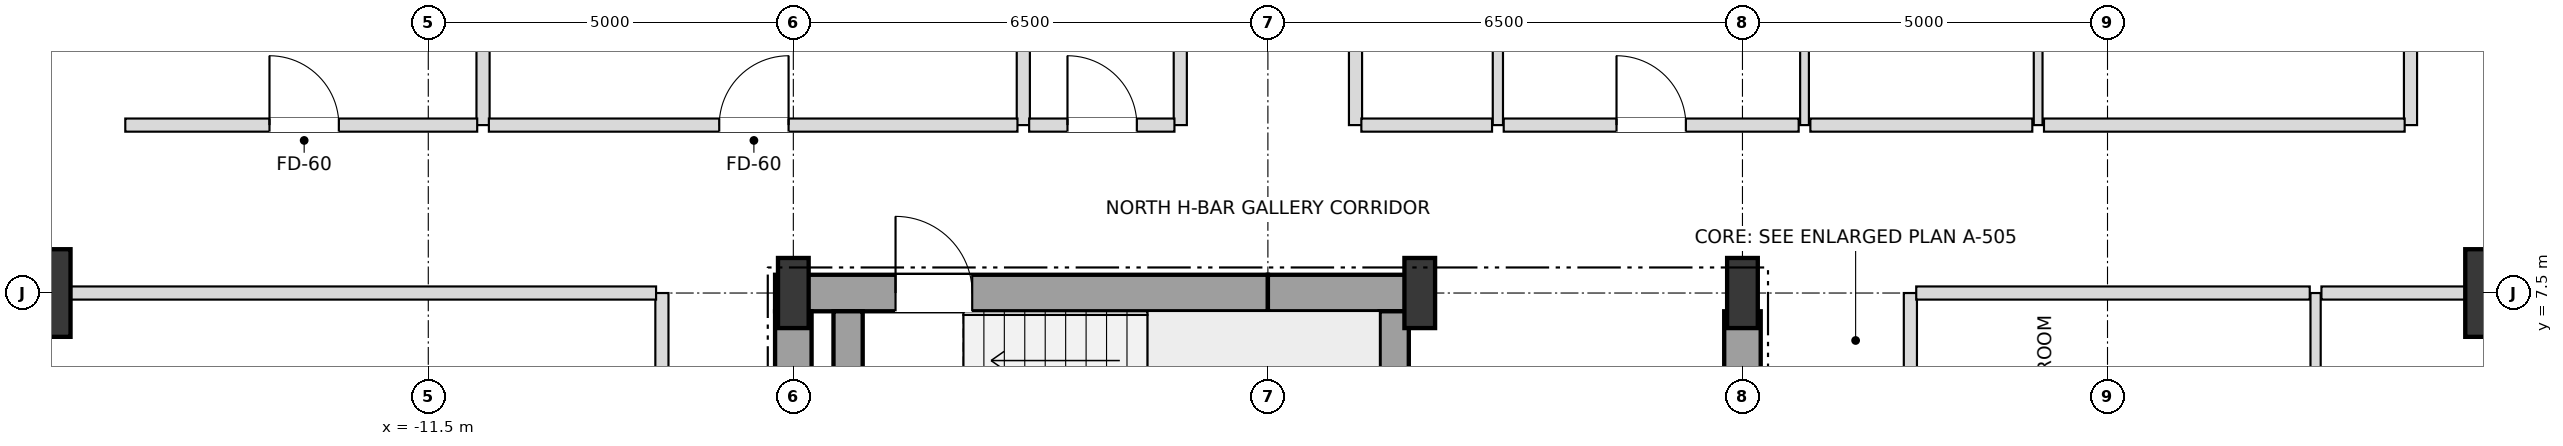
"""IFC4 building model, lengths in metres.
Left out: names, types, materials, properties, quantities, classifications, styles, units other than length and angle.
Written with IfcOpenShell. Run it as: python <this file> out.ifc"""

import sys

from ifc_helpers import new_model, si_unit, direction, frame, frame_2d, origin, origin_2d, place, context, subcontext, project, spatial, rectangle, i_section, extrude, element, fill, save


model = new_model("IFC4")
c1 = context("Model", 3, precision=1e-05, world=origin(), true_north=direction((0.0, 1.0)))
c2 = subcontext(c1, "Body", "Model", "MODEL_VIEW")
j1 = project(units=[si_unit("LENGTHUNIT", "METRE"), si_unit("PLANEANGLEUNIT", "RADIAN")], contexts=[c1])
p1 = place(None, origin())
s1 = spatial("IfcSite", under=j1, at=p1, CompositionType="ELEMENT")
p2 = place(p1, origin())
s2 = spatial("IfcBuilding", under=s1, at=p2, CompositionType="ELEMENT")
p3 = place(p2, frame((0.0, 0.0, 158.4)))
s3 = spatial("IfcBuildingStorey", under=s2, at=p3, CompositionType="ELEMENT", Elevation=158.4)
for number, where, z_axis, x_axis in (
    (1, (-6.5, 7.5, 0.0), (0.0, 0.0, 1.0), (1.0, 0.0, 0.0)),
    (2, (2.08, 7.5, 0.0), (0.0, 0.0, 1.0), (1.0, 0.0, 0.0)),
    (3, (6.5, 7.5, 0.0), (0.0, 0.0, 1.0), (1.0, 0.0, 0.0)),
):
    element("IfcColumn", number, at=place(p3, frame(where, z_axis=z_axis, x_axis=x_axis)), inside=s3, PredefinedType="COLUMN", context=c2, shape_type="SweptSolid", body=[
        extrude(i_section(OverallWidth=0.42, OverallDepth=0.96, WebThickness=0.022, FlangeThickness=0.034, at=origin_2d()), origin(), (0.0, 0.0, 1.0), 3.6),
    ])
for number, where, z_axis, x_axis in (
    (4, (17.0, 7.5, 0.0), (0.0, 0.0, 1.0), (1.0, 0.0, 0.0)),
    (5, (-17.0, 7.5, 0.0), (0.0, 0.0, 1.0), (1.0, 0.0, 0.0)),
):
    element("IfcColumn", number, at=place(p3, frame(where, z_axis=z_axis, x_axis=x_axis)), inside=s3, PredefinedType="USERDEFINED", context=c2, shape_type="SweptSolid", body=[
        extrude(rectangle(XDim=1.2, YDim=1.2, at=origin_2d()), origin(), (0.0, 0.0, 1.0), 3.6),
    ])
p4 = place(p3, frame((-6.75, 7.5, 0.0), z_axis=(0.0, 0.0, 1.0), x_axis=(1.0, 0.0, 0.0)))
e6 = element("IfcWall", 6, at=p4, inside=s3, PredefinedType="SHEAR", context=c2, shape_type="SweptSolid", body=[
    extrude(rectangle(XDim=6.75, YDim=0.5, at=frame_2d((3.375, 0.0))), origin(), (0.0, 0.0, 1.0), 3.38),
])
p5 = place(p4, frame((1.65, 0.0, 0.0)))
e7 = element("IfcOpeningElement", 7, at=p5, cuts=e6, PredefinedType="OPENING", context=c2, shape_type="SweptSolid", body=[
    extrude(rectangle(XDim=1.05, YDim=2.15, at=frame_2d((0.525, 1.075))), frame((0.0, 0.26, 0.0), z_axis=(0.0, -1.0, 0.0), x_axis=(1.0, 0.0, 0.0)), (0.0, 0.0, 1.0), 0.52),
])
p6 = place(p3, frame((0.0, 7.5, 0.0), z_axis=(0.0, 0.0, 1.0), x_axis=(1.0, 0.0, 0.0)))
e8 = element("IfcWall", 8, at=p6, inside=s3, PredefinedType="SHEAR", context=c2, shape_type="SweptSolid", body=[
    extrude(rectangle(XDim=2.08, YDim=0.5, at=frame_2d((1.04, 0.0))), origin(), (0.0, 0.0, 1.0), 3.38),
])
for number, where, z_axis, x_axis in (
    (9, (-6.5, 3.95, 0.0), (0.0, 0.0, 1.0), (0.0, 1.0, 0.0)),
    (10, (6.5, 3.95, 0.0), (0.0, 0.0, 1.0), (0.0, 1.0, 0.0)),
):
    element("IfcWall", number, at=place(p3, frame(where, z_axis=z_axis, x_axis=x_axis)), inside=s3, PredefinedType="SHEAR", context=c2, shape_type="SweptSolid", body=[
        extrude(rectangle(XDim=3.3, YDim=0.5, at=frame_2d((1.65, 0.0))), origin(), (0.0, 0.0, 1.0), 3.38),
    ])
for number, where, z_axis, x_axis in (
    (11, (1.73, 3.95, 0.0), (0.0, 0.0, 1.0), (0.0, 1.0, 0.0)),
    (12, (-5.75, 3.95, 0.0), (0.0, 0.0, 1.0), (0.0, 1.0, 0.0)),
):
    element("IfcWall", number, at=place(p3, frame(where, z_axis=z_axis, x_axis=x_axis)), inside=s3, PredefinedType="SHEAR", context=c2, shape_type="SweptSolid", body=[
        extrude(rectangle(XDim=3.3, YDim=0.4, at=frame_2d((1.65, 0.0))), origin(), (0.0, 0.0, 1.0), 3.38),
    ])
p7 = place(p3, frame((-10.75, 9.8, 0.0), z_axis=(0.0, 0.0, 1.0), x_axis=(0.0, 1.0, 0.0)))
e13 = element("IfcWall", 13, at=p7, inside=s3, PredefinedType="PARTITIONING", context=c2, shape_type="SweptSolid", body=[
    extrude(rectangle(XDim=13.35, YDim=0.18, at=frame_2d((6.675, 0.0))), origin(), (0.0, 0.0, 1.0), 2.816),
])
p8 = place(p3, frame((-8.3, -7.5, 0.0), z_axis=(0.0, 0.0, 1.0), x_axis=(0.0, 1.0, 0.0)))
e14 = element("IfcWall", 14, at=p8, inside=s3, PredefinedType="PARTITIONING", context=c2, shape_type="SweptSolid", body=[
    extrude(rectangle(XDim=15.0, YDim=0.18, at=frame_2d((7.5, 0.0))), origin(), (0.0, 0.0, 1.0), 3.38),
])
p9 = place(p8, frame((0.605, 0.0, 0.0)))
e15 = element("IfcOpeningElement", 15, at=p9, cuts=e14, PredefinedType="OPENING", context=c2, shape_type="SweptSolid", body=[
    extrude(rectangle(XDim=0.95, YDim=2.15, at=frame_2d((0.475, 1.075))), frame((0.0, 0.1, 0.0), z_axis=(0.0, -1.0, 0.0), x_axis=(1.0, 0.0, 0.0)), (0.0, 0.0, 1.0), 0.2),
])
p10 = place(p8, frame((2.605, 0.0, 0.0)))
e16 = element("IfcOpeningElement", 16, at=p10, cuts=e14, PredefinedType="OPENING", context=c2, shape_type="SweptSolid", body=[
    extrude(rectangle(XDim=0.95, YDim=2.15, at=frame_2d((0.475, 1.075))), frame((0.0, 0.1, 0.0), z_axis=(0.0, -1.0, 0.0), x_axis=(1.0, 0.0, 0.0)), (0.0, 0.0, 1.0), 0.2),
])
for number, where, z_axis, x_axis in (
    (17, (-3.35, 9.8, 0.0), (0.0, 0.0, 1.0), (0.0, 1.0, 0.0)),
    (18, (-1.2, 9.8, 0.0), (0.0, 0.0, 1.0), (0.0, 1.0, 0.0)),
    (19, (1.2, 9.8, 0.0), (0.0, 0.0, 1.0), (0.0, 1.0, 0.0)),
):
    element("IfcWall", number, at=place(p3, frame(where, z_axis=z_axis, x_axis=x_axis)), inside=s3, PredefinedType="PARTITIONING", context=c2, shape_type="SweptSolid", body=[
        extrude(rectangle(XDim=13.35, YDim=0.18, at=frame_2d((6.675, 0.0))), origin(), (0.0, 0.0, 1.0), 2.816),
    ])
p11 = place(p3, frame((3.15, 9.8, 0.0), z_axis=(0.0, 0.0, 1.0), x_axis=(0.0, 1.0, 0.0)))
e20 = element("IfcWall", 20, at=p11, inside=s3, PredefinedType="PARTITIONING", context=c2, shape_type="SweptSolid", body=[
    extrude(rectangle(XDim=7.35, YDim=0.14, at=frame_2d((3.675, 0.0))), origin(), (0.0, 0.0, 1.0), 3.38),
])
p12 = place(p11, frame((3.22, 0.0, 0.0)))
e21 = element("IfcOpeningElement", 21, at=p12, cuts=e20, PredefinedType="OPENING", context=c2, shape_type="SweptSolid", body=[
    extrude(rectangle(XDim=0.9, YDim=2.1, at=frame_2d((0.45, 1.05))), frame((0.0, 0.08, 0.0), z_axis=(0.0, -1.0, 0.0), x_axis=(1.0, 0.0, 0.0)), (0.0, 0.0, 1.0), 0.16),
])
p13 = place(p3, frame((7.35, 9.8, 0.0), z_axis=(0.0, 0.0, 1.0), x_axis=(0.0, 1.0, 0.0)))
e22 = element("IfcWall", 22, at=p13, inside=s3, PredefinedType="PARTITIONING", context=c2, shape_type="SweptSolid", body=[
    extrude(rectangle(XDim=13.35, YDim=0.12, at=frame_2d((6.675, 0.0))), origin(), (0.0, 0.0, 1.0), 2.816),
])
p14 = place(p13, frame((3.195, 0.0, 0.0)))
e23 = element("IfcOpeningElement", 23, at=p14, cuts=e22, PredefinedType="OPENING", context=c2, shape_type="SweptSolid", body=[
    extrude(rectangle(XDim=0.95, YDim=2.1, at=frame_2d((0.475, 1.05))), frame((0.0, 0.07, 0.0), z_axis=(0.0, -1.0, 0.0), x_axis=(1.0, 0.0, 0.0)), (0.0, 0.0, 1.0), 0.14),
])
p15 = place(p13, frame((11.051, 0.0, 0.0)))
e24 = element("IfcOpeningElement", 24, at=p15, cuts=e22, PredefinedType="OPENING", context=c2, shape_type="SweptSolid", body=[
    extrude(rectangle(XDim=0.9, YDim=2.1, at=frame_2d((0.45, 1.05))), frame((0.0, 0.07, 0.0), z_axis=(0.0, -1.0, 0.0), x_axis=(1.0, 0.0, 0.0)), (0.0, 0.0, 1.0), 0.14),
])
p16 = place(p3, frame((8.8, -7.5, 0.0), z_axis=(0.0, 0.0, 1.0), x_axis=(0.0, 1.0, 0.0)))
e25 = element("IfcWall", 25, at=p16, inside=s3, PredefinedType="PARTITIONING", context=c2, shape_type="SweptSolid", body=[
    extrude(rectangle(XDim=15.0, YDim=0.18, at=frame_2d((7.5, 0.0))), origin(), (0.0, 0.0, 1.0), 3.38),
])
p17 = place(p16, frame((3.475, 0.0, 0.0)))
e26 = element("IfcOpeningElement", 26, at=p17, cuts=e25, PredefinedType="OPENING", context=c2, shape_type="SweptSolid", body=[
    extrude(rectangle(XDim=0.95, YDim=2.15, at=frame_2d((0.475, 1.075))), frame((0.0, 0.1, 0.0), z_axis=(0.0, -1.0, 0.0), x_axis=(1.0, 0.0, 0.0)), (0.0, 0.0, 1.0), 0.2),
])
p18 = place(p3, frame((10.55, 9.8, 0.0), z_axis=(0.0, 0.0, 1.0), x_axis=(0.0, 1.0, 0.0)))
e27 = element("IfcWall", 27, at=p18, inside=s3, PredefinedType="PARTITIONING", context=c2, shape_type="SweptSolid", body=[
    extrude(rectangle(XDim=13.35, YDim=0.12, at=frame_2d((6.675, 0.0))), origin(), (0.0, 0.0, 1.0), 2.816),
])
p19 = place(p18, frame((3.713, 0.0, 0.0)))
e28 = element("IfcOpeningElement", 28, at=p19, cuts=e27, PredefinedType="OPENING", context=c2, shape_type="SweptSolid", body=[
    extrude(rectangle(XDim=0.95, YDim=2.1, at=frame_2d((0.475, 1.05))), frame((0.0, 0.07, 0.0), z_axis=(0.0, -1.0, 0.0), x_axis=(1.0, 0.0, 0.0)), (0.0, 0.0, 1.0), 0.14),
])
p20 = place(p18, frame((11.051, 0.0, 0.0)))
e29 = element("IfcOpeningElement", 29, at=p20, cuts=e27, PredefinedType="OPENING", context=c2, shape_type="SweptSolid", body=[
    extrude(rectangle(XDim=0.9, YDim=2.1, at=frame_2d((0.45, 1.05))), frame((0.0, 0.07, 0.0), z_axis=(0.0, -1.0, 0.0), x_axis=(1.0, 0.0, 0.0)), (0.0, 0.0, 1.0), 0.14),
])
p21 = place(p3, frame((14.35, -7.5, 0.0), z_axis=(0.0, 0.0, 1.0), x_axis=(0.0, 1.0, 0.0)))
e30 = element("IfcWall", 30, at=p21, inside=s3, PredefinedType="PARTITIONING", context=c2, shape_type="SweptSolid", body=[
    extrude(rectangle(XDim=15.0, YDim=0.14, at=frame_2d((7.5, 0.0))), origin(), (0.0, 0.0, 1.0), 3.38),
])
p22 = place(p21, frame((3.475, 0.0, 0.0)))
e31 = element("IfcOpeningElement", 31, at=p22, cuts=e30, PredefinedType="OPENING", context=c2, shape_type="SweptSolid", body=[
    extrude(rectangle(XDim=0.95, YDim=2.1, at=frame_2d((0.475, 1.05))), frame((0.0, 0.08, 0.0), z_axis=(0.0, -1.0, 0.0), x_axis=(1.0, 0.0, 0.0)), (0.0, 0.0, 1.0), 0.16),
])
p23 = place(p3, frame((15.65, 9.8, 0.0), z_axis=(0.0, 0.0, 1.0), x_axis=(0.0, 1.0, 0.0)))
e32 = element("IfcWall", 32, at=p23, inside=s3, PredefinedType="PARTITIONING", context=c2, shape_type="SweptSolid", body=[
    extrude(rectangle(XDim=7.35, YDim=0.18, at=frame_2d((3.675, 0.0))), origin(), (0.0, 0.0, 1.0), 2.736),
])
p24 = place(p3, frame((-20.15, 7.5, 0.0), z_axis=(0.0, 0.0, 1.0), x_axis=(1.0, 0.0, 0.0)))
e33 = element("IfcWall", 33, at=p24, inside=s3, PredefinedType="PARTITIONING", context=c2, shape_type="SweptSolid", body=[
    extrude(rectangle(XDim=11.77, YDim=0.18, at=frame_2d((5.885, 0.0))), origin(), (0.0, 0.0, 1.0), 2.816),
])
p25 = place(p3, frame((8.88, 7.5, 0.0), z_axis=(0.0, 0.0, 1.0), x_axis=(1.0, 0.0, 0.0)))
e34 = element("IfcWall", 34, at=p25, inside=s3, PredefinedType="PARTITIONING", context=c2, shape_type="SweptSolid", body=[
    extrude(rectangle(XDim=5.39, YDim=0.18, at=frame_2d((2.695, 0.0))), origin(), (0.0, 0.0, 1.0), 2.816),
])
p26 = place(p3, frame((14.43, 7.5, 0.0), z_axis=(0.0, 0.0, 1.0), x_axis=(1.0, 0.0, 0.0)))
e35 = element("IfcWall", 35, at=p26, inside=s3, PredefinedType="PARTITIONING", context=c2, shape_type="SweptSolid", body=[
    extrude(rectangle(XDim=5.72, YDim=0.18, at=frame_2d((2.86, 0.0))), origin(), (0.0, 0.0, 1.0), 2.816),
])
p27 = place(p3, frame((-15.65, 9.8, 0.0), z_axis=(0.0, 0.0, 1.0), x_axis=(1.0, 0.0, 0.0)))
e36 = element("IfcWall", 36, at=p27, inside=s3, PredefinedType="PARTITIONING", context=c2, shape_type="SweptSolid", body=[
    extrude(rectangle(XDim=4.82, YDim=0.18, at=frame_2d((2.41, 0.0))), origin(), (0.0, 0.0, 1.0), 3.38),
])
p28 = place(p27, frame((1.975, 0.0, 0.0)))
e37 = element("IfcOpeningElement", 37, at=p28, cuts=e36, PredefinedType="OPENING", context=c2, shape_type="SweptSolid", body=[
    extrude(rectangle(XDim=0.95, YDim=2.15, at=frame_2d((0.475, 1.075))), frame((0.0, 0.1, 0.0), z_axis=(0.0, -1.0, 0.0), x_axis=(1.0, 0.0, 0.0)), (0.0, 0.0, 1.0), 0.2),
])
p29 = place(p3, frame((-10.67, 9.8, 0.0), z_axis=(0.0, 0.0, 1.0), x_axis=(1.0, 0.0, 0.0)))
e38 = element("IfcWall", 38, at=p29, inside=s3, PredefinedType="PARTITIONING", context=c2, shape_type="SweptSolid", body=[
    extrude(rectangle(XDim=7.24, YDim=0.18, at=frame_2d((3.62, 0.0))), origin(), (0.0, 0.0, 1.0), 2.816),
])
p30 = place(p29, frame((3.155, 0.0, 0.0)))
e39 = element("IfcOpeningElement", 39, at=p30, cuts=e38, PredefinedType="OPENING", context=c2, shape_type="SweptSolid", body=[
    extrude(rectangle(XDim=0.95, YDim=2.15, at=frame_2d((0.475, 1.075))), frame((0.0, 0.1, 0.0), z_axis=(0.0, -1.0, 0.0), x_axis=(1.0, 0.0, 0.0)), (0.0, 0.0, 1.0), 0.2),
])
p31 = place(p3, frame((-3.27, 9.8, 0.0), z_axis=(0.0, 0.0, 1.0), x_axis=(1.0, 0.0, 0.0)))
e40 = element("IfcWall", 40, at=p31, inside=s3, PredefinedType="PARTITIONING", context=c2, shape_type="SweptSolid", body=[
    extrude(rectangle(XDim=1.99, YDim=0.18, at=frame_2d((0.995, 0.0))), origin(), (0.0, 0.0, 1.0), 3.38),
])
p32 = place(p31, frame((0.525, 0.0, 0.0)))
e41 = element("IfcOpeningElement", 41, at=p32, cuts=e40, PredefinedType="OPENING", context=c2, shape_type="SweptSolid", body=[
    extrude(rectangle(XDim=0.95, YDim=2.15, at=frame_2d((0.475, 1.075))), frame((0.0, 0.1, 0.0), z_axis=(0.0, -1.0, 0.0), x_axis=(1.0, 0.0, 0.0)), (0.0, 0.0, 1.0), 0.2),
])
p33 = place(p3, frame((1.28, 9.8, 0.0), z_axis=(0.0, 0.0, 1.0), x_axis=(1.0, 0.0, 0.0)))
e42 = element("IfcWall", 42, at=p33, inside=s3, PredefinedType="PARTITIONING", context=c2, shape_type="SweptSolid", body=[
    extrude(rectangle(XDim=1.79, YDim=0.18, at=frame_2d((0.895, 0.0))), origin(), (0.0, 0.0, 1.0), 3.38),
])
p34 = place(p3, frame((3.23, 9.8, 0.0), z_axis=(0.0, 0.0, 1.0), x_axis=(1.0, 0.0, 0.0)))
e43 = element("IfcWall", 43, at=p34, inside=s3, PredefinedType="PARTITIONING", context=c2, shape_type="SweptSolid", body=[
    extrude(rectangle(XDim=4.04, YDim=0.18, at=frame_2d((2.02, 0.0))), origin(), (0.0, 0.0, 1.0), 2.816),
])
p35 = place(p34, frame((1.545, 0.0, 0.0)))
e44 = element("IfcOpeningElement", 44, at=p35, cuts=e43, PredefinedType="OPENING", context=c2, shape_type="SweptSolid", body=[
    extrude(rectangle(XDim=0.95, YDim=2.15, at=frame_2d((0.475, 1.075))), frame((0.0, 0.1, 0.0), z_axis=(0.0, -1.0, 0.0), x_axis=(1.0, 0.0, 0.0)), (0.0, 0.0, 1.0), 0.2),
])
p36 = place(p3, frame((7.43, 9.8, 0.0), z_axis=(0.0, 0.0, 1.0), x_axis=(1.0, 0.0, 0.0)))
e45 = element("IfcWall", 45, at=p36, inside=s3, PredefinedType="PARTITIONING", context=c2, shape_type="SweptSolid", body=[
    extrude(rectangle(XDim=3.04, YDim=0.18, at=frame_2d((1.52, 0.0))), origin(), (0.0, 0.0, 1.0), 3.38),
])
p37 = place(p3, frame((10.63, 9.8, 0.0), z_axis=(0.0, 0.0, 1.0), x_axis=(1.0, 0.0, 0.0)))
e46 = element("IfcWall", 46, at=p37, inside=s3, PredefinedType="PARTITIONING", context=c2, shape_type="SweptSolid", body=[
    extrude(rectangle(XDim=4.94, YDim=0.18, at=frame_2d((2.47, 0.0))), origin(), (0.0, 0.0, 1.0), 3.38),
])
p38 = place(p5, origin())
e47 = element("IfcDoor", 47, at=p38, inside=s3, OperationType="SINGLE_SWING_LEFT", PredefinedType="DOOR", context=c2, shape_type="SweptSolid", body=[
    extrude(rectangle(XDim=1.05, YDim=2.15, at=frame_2d((0.525, 1.075))), frame((0.0, 0.025, 0.0), z_axis=(0.0, -1.0, 0.0), x_axis=(1.0, 0.0, 0.0)), (0.0, 0.0, 1.0), 0.05),
])
fill(e7, e47)
p39 = place(p28, origin())
e48 = element("IfcDoor", 48, at=p39, inside=s3, OperationType="SINGLE_SWING_LEFT", PredefinedType="DOOR", context=c2, shape_type="SweptSolid", body=[
    extrude(rectangle(XDim=0.95, YDim=2.15, at=frame_2d((0.475, 1.075))), frame((0.0, 0.025, 0.0), z_axis=(0.0, -1.0, 0.0), x_axis=(1.0, 0.0, 0.0)), (0.0, 0.0, 1.0), 0.05),
])
fill(e37, e48)
p40 = place(p30, origin())
e49 = element("IfcDoor", 49, at=p40, inside=s3, OperationType="SINGLE_SWING_RIGHT", PredefinedType="DOOR", context=c2, shape_type="SweptSolid", body=[
    extrude(rectangle(XDim=0.95, YDim=2.15, at=frame_2d((0.475, 1.075))), frame((0.0, 0.025, 0.0), z_axis=(0.0, -1.0, 0.0), x_axis=(1.0, 0.0, 0.0)), (0.0, 0.0, 1.0), 0.05),
])
fill(e39, e49)
p41 = place(p32, origin())
e50 = element("IfcDoor", 50, at=p41, inside=s3, OperationType="SINGLE_SWING_LEFT", PredefinedType="DOOR", context=c2, shape_type="SweptSolid", body=[
    extrude(rectangle(XDim=0.95, YDim=2.15, at=frame_2d((0.475, 1.075))), frame((0.0, 0.025, 0.0), z_axis=(0.0, -1.0, 0.0), x_axis=(1.0, 0.0, 0.0)), (0.0, 0.0, 1.0), 0.05),
])
fill(e41, e50)
p42 = place(p35, origin())
e51 = element("IfcDoor", 51, at=p42, inside=s3, OperationType="SINGLE_SWING_LEFT", PredefinedType="DOOR", context=c2, shape_type="SweptSolid", body=[
    extrude(rectangle(XDim=0.95, YDim=2.15, at=frame_2d((0.475, 1.075))), frame((0.0, 0.025, 0.0), z_axis=(0.0, -1.0, 0.0), x_axis=(1.0, 0.0, 0.0)), (0.0, 0.0, 1.0), 0.05),
])
fill(e44, e51)
save(model, sys.argv[1])
